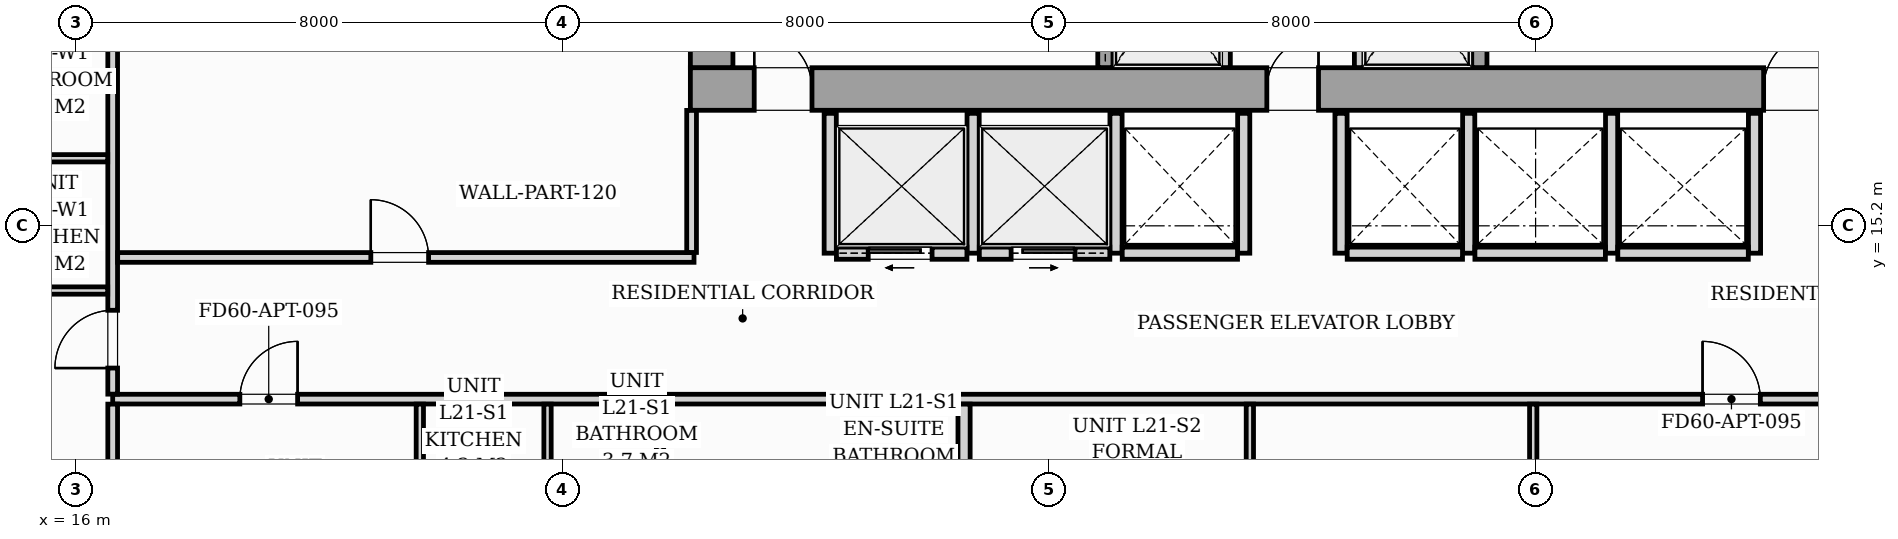
"""IFC4 building model, lengths in metres.
Left out: names, types, materials, properties, quantities, classifications, styles, units other than length and angle.
Written with IfcOpenShell. Run it as: python <this file> out.ifc"""

import sys

from ifc_helpers import new_model, si_unit, direction, frame, frame_2d, origin, origin_2d, place, context, subcontext, project, spatial, rectangle, i_section, extrude, source, transform, mapped, element, fill, save


model = new_model("IFC4")
c1 = context("Model", 3, precision=1e-05, world=origin(), true_north=direction((0.0, 1.0)))
c2 = subcontext(c1, "Body", "Model", "MODEL_VIEW")
j1 = project(units=[si_unit("LENGTHUNIT", "METRE"), si_unit("PLANEANGLEUNIT", "RADIAN")], contexts=[c1])
p1 = place(None, origin())
s1 = spatial("IfcSite", under=j1, at=p1, CompositionType="ELEMENT")
p2 = place(p1, origin())
s2 = spatial("IfcBuilding", under=s1, at=p2, CompositionType="ELEMENT")
p3 = place(p2, frame((0.0, 0.0, 77.8)))
s3 = spatial("IfcBuildingStorey", under=s2, at=p3, CompositionType="ELEMENT", Elevation=77.8)
m1 = source(origin(), c2, "Body", "SweptSolid", [
    extrude(i_section(OverallWidth=0.427, OverallDepth=0.483, WebThickness=0.051, FlangeThickness=0.082, FilletRadius=0.018, at=origin_2d()), origin(), (0.0, 0.0, 1.0), 3.196),
])
for number, where, z_axis, x_axis in (
    (1, (26.4, 17.4, 0.002), (0.0, 0.0, 1.0), (1.0, 0.0, 0.0)),
    (2, (33.12, 17.4, 0.002), (0.0, 0.0, 1.0), (1.0, 0.0, 0.0)),
    (3, (38.88, 17.4, 0.002), (0.0, 0.0, 1.0), (1.0, 0.0, 0.0)),
):
    element("IfcColumn", number, at=place(p3, frame(where, z_axis=z_axis, x_axis=x_axis)), inside=s3, PredefinedType="PILASTER", context=c2, shape_type="MappedRepresentation", body=[
        mapped(m1, transform((0.0, 0.0, 0.0), scale=1.0)),
    ])
p4 = place(p3, frame((26.1, 17.45, 0.0), z_axis=(0.0, 0.0, 1.0), x_axis=(1.0, 0.0, 0.0)))
e4 = element("IfcWall", 4, at=p4, inside=s3, PredefinedType="SHEAR", context=c2, shape_type="SweptSolid", body=[
    extrude(rectangle(XDim=19.8, YDim=0.7, at=frame_2d((9.9, 0.0))), origin(), (0.0, 0.0, 1.0), 3.2),
])
p5 = place(p4, frame((1.05, 0.0, 0.0)))
e5 = element("IfcOpeningElement", 5, at=p5, cuts=e4, PredefinedType="OPENING", context=c2, shape_type="SweptSolid", body=[
    extrude(rectangle(XDim=0.95, YDim=2.06, at=frame_2d((0.475, 1.03))), frame((0.0, 0.36, 0.0), z_axis=(0.0, -1.0, 0.0), x_axis=(1.0, 0.0, 0.0)), (0.0, 0.0, 1.0), 0.72),
])
p6 = place(p4, frame((9.48, 0.0, 0.0)))
e6 = element("IfcOpeningElement", 6, at=p6, cuts=e4, PredefinedType="OPENING", context=c2, shape_type="SweptSolid", body=[
    extrude(rectangle(XDim=0.85, YDim=2.0, at=frame_2d((0.425, 1.0))), frame((0.0, 0.36, 0.0), z_axis=(0.0, -1.0, 0.0), x_axis=(1.0, 0.0, 0.0)), (0.0, 0.0, 1.0), 0.72),
])
p7 = place(p4, frame((17.65, 0.0, 0.0)))
e7 = element("IfcOpeningElement", 7, at=p7, cuts=e4, PredefinedType="OPENING", context=c2, shape_type="SweptSolid", body=[
    extrude(rectangle(XDim=0.95, YDim=2.06, at=frame_2d((0.475, 1.03))), frame((0.0, 0.36, 0.0), z_axis=(0.0, -1.0, 0.0), x_axis=(1.0, 0.0, 0.0)), (0.0, 0.0, 1.0), 0.72),
])
p8 = place(p3, frame((26.45, 17.802, 0.0), z_axis=(0.0, 0.0, 1.0), x_axis=(0.0, 1.0, 0.0)))
e8 = element("IfcWall", 8, at=p8, inside=s3, PredefinedType="SHEAR", context=c2, shape_type="SweptSolid", body=[
    extrude(rectangle(XDim=5.796, YDim=0.7, at=frame_2d((2.898, 0.0))), origin(), (0.0, 0.0, 1.0), 3.2),
])
p9 = place(p3, frame((32.925, 17.802, 0.0), z_axis=(0.0, 0.0, 1.0), x_axis=(0.0, 1.0, 0.0)))
e9 = element("IfcWall", 9, at=p9, inside=s3, PredefinedType="SOLIDWALL", context=c2, shape_type="SweptSolid", body=[
    extrude(rectangle(XDim=2.646, YDim=0.25, at=frame_2d((1.323, 0.0))), origin(), (0.0, 0.0, 1.0), 3.2),
])
p10 = place(p9, frame((0.598, 0.0, 0.0)))
e10 = element("IfcOpeningElement", 10, at=p10, cuts=e9, PredefinedType="OPENING", context=c2, shape_type="SweptSolid", body=[
    extrude(rectangle(XDim=1.1, YDim=2.08, at=frame_2d((0.55, 1.04))), frame((0.0, 0.135, 0.0), z_axis=(0.0, -1.0, 0.0), x_axis=(1.0, 0.0, 0.0)), (0.0, 0.0, 1.0), 0.27),
])
for number, where, z_axis, x_axis in (
    (11, (34.9, 17.802, 0.0), (0.0, 0.0, 1.0), (0.0, 1.0, 0.0)),
    (12, (37.1, 17.802, 0.0), (0.0, 0.0, 1.0), (0.0, 1.0, 0.0)),
):
    element("IfcWall", number, at=place(p3, frame(where, z_axis=z_axis, x_axis=x_axis)), inside=s3, PredefinedType="PARTITIONING", context=c2, shape_type="SweptSolid", body=[
        extrude(rectangle(XDim=2.646, YDim=0.16, at=frame_2d((1.323, 0.0))), origin(), (0.0, 0.0, 1.0), 2.94),
    ])
p11 = place(p3, frame((39.075, 17.802, 0.0), z_axis=(0.0, 0.0, 1.0), x_axis=(0.0, 1.0, 0.0)))
e13 = element("IfcWall", 13, at=p11, inside=s3, PredefinedType="SOLIDWALL", context=c2, shape_type="SweptSolid", body=[
    extrude(rectangle(XDim=2.646, YDim=0.25, at=frame_2d((1.323, 0.0))), origin(), (0.0, 0.0, 1.0), 3.2),
])
p12 = place(p11, frame((0.598, 0.0, 0.0)))
e14 = element("IfcOpeningElement", 14, at=p12, cuts=e13, PredefinedType="OPENING", context=c2, shape_type="SweptSolid", body=[
    extrude(rectangle(XDim=1.1, YDim=2.08, at=frame_2d((0.55, 1.04))), frame((0.0, 0.135, 0.0), z_axis=(0.0, -1.0, 0.0), x_axis=(1.0, 0.0, 0.0)), (0.0, 0.0, 1.0), 0.27),
])
for number, where, z_axis, x_axis in (
    (15, (28.4, 14.75, 0.0), (0.0, 0.0, 1.0), (0.0, 1.0, 0.0)),
    (16, (30.75, 14.75, 0.0), (0.0, 0.0, 1.0), (0.0, 1.0, 0.0)),
    (17, (33.1, 14.75, 0.0), (0.0, 0.0, 1.0), (0.0, 1.0, 0.0)),
):
    element("IfcWall", number, at=place(p3, frame(where, z_axis=z_axis, x_axis=x_axis)), inside=s3, PredefinedType="PARTITIONING", context=c2, shape_type="SweptSolid", body=[
        extrude(rectangle(XDim=2.3, YDim=0.2, at=frame_2d((1.15, 0.0))), origin(), (0.0, 0.0, 1.0), 2.94),
    ])
p13 = place(p3, frame((28.502, 14.75, 0.0), z_axis=(0.0, 0.0, 1.0), x_axis=(1.0, 0.0, 0.0)))
e18 = element("IfcWall", 18, at=p13, inside=s3, PredefinedType="PARTITIONING", context=c2, shape_type="SweptSolid", body=[
    extrude(rectangle(XDim=2.146, YDim=0.2, at=frame_2d((1.073, 0.0))), origin(), (0.0, 0.0, 1.0), 2.94),
])
p14 = place(p13, frame((0.523, 0.0, 0.0)))
e19 = element("IfcOpeningElement", 19, at=p14, cuts=e18, PredefinedType="OPENING", context=c2, shape_type="SweptSolid", body=[
    extrude(rectangle(XDim=1.05, YDim=2.08, at=frame_2d((0.525, 1.04))), frame((0.0, 0.11, 0.0), z_axis=(0.0, -1.0, 0.0), x_axis=(1.0, 0.0, 0.0)), (0.0, 0.0, 1.0), 0.22),
])
p15 = place(p3, frame((30.852, 14.75, 0.0), z_axis=(0.0, 0.0, 1.0), x_axis=(1.0, 0.0, 0.0)))
e20 = element("IfcWall", 20, at=p15, inside=s3, PredefinedType="PARTITIONING", context=c2, shape_type="SweptSolid", body=[
    extrude(rectangle(XDim=2.146, YDim=0.2, at=frame_2d((1.073, 0.0))), origin(), (0.0, 0.0, 1.0), 2.94),
])
p16 = place(p15, frame((0.523, 0.0, 0.0)))
e21 = element("IfcOpeningElement", 21, at=p16, cuts=e20, PredefinedType="OPENING", context=c2, shape_type="SweptSolid", body=[
    extrude(rectangle(XDim=1.05, YDim=2.08, at=frame_2d((0.525, 1.04))), frame((0.0, 0.11, 0.0), z_axis=(0.0, -1.0, 0.0), x_axis=(1.0, 0.0, 0.0)), (0.0, 0.0, 1.0), 0.22),
])
p17 = place(p3, frame((35.2, 14.75, 0.0), z_axis=(0.0, 0.0, 1.0), x_axis=(0.0, 1.0, 0.0)))
e22 = element("IfcWall", 22, at=p17, inside=s3, PredefinedType="PARTITIONING", context=c2, shape_type="SweptSolid", body=[
    extrude(rectangle(XDim=2.3, YDim=0.2, at=frame_2d((1.15, 0.0))), origin(), (0.0, 0.0, 1.0), 2.94),
])
p18 = place(p3, frame((33.202, 14.75, 0.0), z_axis=(0.0, 0.0, 1.0), x_axis=(1.0, 0.0, 0.0)))
e23 = element("IfcWall", 23, at=p18, inside=s3, PredefinedType="PARTITIONING", context=c2, shape_type="SweptSolid", body=[
    extrude(rectangle(XDim=1.896, YDim=0.2, at=frame_2d((0.948, 0.0))), origin(), (0.0, 0.0, 1.0), 2.94),
])
for number, where, z_axis, x_axis in (
    (24, (36.8, 14.75, 0.0), (0.0, 0.0, 1.0), (0.0, 1.0, 0.0)),
    (25, (38.9, 14.75, 0.0), (0.0, 0.0, 1.0), (0.0, 1.0, 0.0)),
):
    element("IfcWall", number, at=place(p3, frame(where, z_axis=z_axis, x_axis=x_axis)), inside=s3, PredefinedType="PARTITIONING", context=c2, shape_type="SweptSolid", body=[
        extrude(rectangle(XDim=2.3, YDim=0.2, at=frame_2d((1.15, 0.0))), origin(), (0.0, 0.0, 1.0), 2.94),
    ])
p19 = place(p3, frame((36.902, 14.75, 0.0), z_axis=(0.0, 0.0, 1.0), x_axis=(1.0, 0.0, 0.0)))
e26 = element("IfcWall", 26, at=p19, inside=s3, PredefinedType="PARTITIONING", context=c2, shape_type="SweptSolid", body=[
    extrude(rectangle(XDim=1.896, YDim=0.2, at=frame_2d((0.948, 0.0))), origin(), (0.0, 0.0, 1.0), 2.94),
])
for number, where, z_axis, x_axis in (
    (27, (41.25, 14.75, 0.0), (0.0, 0.0, 1.0), (0.0, 1.0, 0.0)),
    (28, (43.6, 14.75, 0.0), (0.0, 0.0, 1.0), (0.0, 1.0, 0.0)),
):
    element("IfcWall", number, at=place(p3, frame(where, z_axis=z_axis, x_axis=x_axis)), inside=s3, PredefinedType="PARTITIONING", context=c2, shape_type="SweptSolid", body=[
        extrude(rectangle(XDim=2.3, YDim=0.2, at=frame_2d((1.15, 0.0))), origin(), (0.0, 0.0, 1.0), 2.94),
    ])
for number, where, z_axis, x_axis in (
    (29, (39.002, 14.75, 0.0), (0.0, 0.0, 1.0), (1.0, 0.0, 0.0)),
    (30, (41.352, 14.75, 0.0), (0.0, 0.0, 1.0), (1.0, 0.0, 0.0)),
):
    element("IfcWall", number, at=place(p3, frame(where, z_axis=z_axis, x_axis=x_axis)), inside=s3, PredefinedType="PARTITIONING", context=c2, shape_type="SweptSolid", body=[
        extrude(rectangle(XDim=2.146, YDim=0.2, at=frame_2d((1.073, 0.0))), origin(), (0.0, 0.0, 1.0), 2.94),
    ])
p20 = place(p3, frame((16.6, 12.35, 0.0), z_axis=(0.0, 0.0, 1.0), x_axis=(1.0, 0.0, 0.0)))
e31 = element("IfcWall", 31, at=p20, inside=s3, PredefinedType="PARTITIONING", context=c2, shape_type="SweptSolid", body=[
    extrude(rectangle(XDim=37.6, YDim=0.16, at=frame_2d((18.8, 0.0))), origin(), (0.0, 0.0, 1.0), 2.94),
])
p21 = place(p20, frame((2.091, 0.0, 0.0)))
e32 = element("IfcOpeningElement", 32, at=p21, cuts=e31, PredefinedType="OPENING", context=c2, shape_type="SweptSolid", body=[
    extrude(rectangle(XDim=0.95, YDim=2.06, at=frame_2d((0.475, 1.03))), frame((0.0, 0.09, 0.0), z_axis=(0.0, -1.0, 0.0), x_axis=(1.0, 0.0, 0.0)), (0.0, 0.0, 1.0), 0.18),
])
p22 = place(p20, frame((26.146, 0.0, 0.0)))
e33 = element("IfcOpeningElement", 33, at=p22, cuts=e31, PredefinedType="OPENING", context=c2, shape_type="SweptSolid", body=[
    extrude(rectangle(XDim=0.95, YDim=2.06, at=frame_2d((0.475, 1.03))), frame((0.0, 0.09, 0.0), z_axis=(0.0, -1.0, 0.0), x_axis=(1.0, 0.0, 0.0)), (0.0, 0.0, 1.0), 0.18),
])
p23 = place(p3, frame((16.6, 4.341, 0.0), z_axis=(0.0, 0.0, 1.0), x_axis=(0.0, 1.0, 0.0)))
e34 = element("IfcWall", 34, at=p23, inside=s3, PredefinedType="PARTITIONING", context=c2, shape_type="SweptSolid", body=[
    extrude(rectangle(XDim=7.927, YDim=0.16, at=frame_2d((3.964, 0.0))), origin(), (0.0, 0.0, 1.0), 2.94),
])
p24 = place(p3, frame((16.6, 12.432, 0.0), z_axis=(0.0, 0.0, 1.0), x_axis=(0.0, 1.0, 0.0)))
e35 = element("IfcWall", 35, at=p24, inside=s3, PredefinedType="PARTITIONING", context=c2, shape_type="SweptSolid", body=[
    extrude(rectangle(XDim=11.475, YDim=0.16, at=frame_2d((5.738, 0.0))), origin(), (0.0, 0.0, 1.0), 2.94),
])
p25 = place(p24, frame((0.429, 0.0, 0.0)))
e36 = element("IfcOpeningElement", 36, at=p25, cuts=e35, PredefinedType="OPENING", context=c2, shape_type="SweptSolid", body=[
    extrude(rectangle(XDim=0.95, YDim=2.06, at=frame_2d((0.475, 1.03))), frame((0.0, 0.09, 0.0), z_axis=(0.0, -1.0, 0.0), x_axis=(1.0, 0.0, 0.0)), (0.0, 0.0, 1.0), 0.18),
])
p26 = place(p3, frame((25.601, 5.208, 0.0), z_axis=(0.0, 0.0, 1.0), x_axis=(0.0, 1.0, 0.0)))
e37 = element("IfcWall", 37, at=p26, inside=s3, PredefinedType="PARTITIONING", context=c2, shape_type="SweptSolid", body=[
    extrude(rectangle(XDim=7.061, YDim=0.12, at=frame_2d((3.53, 0.0))), origin(), (0.0, 0.0, 1.0), 2.94),
])
p27 = place(p26, frame((3.792, 0.0, 0.0)))
e38 = element("IfcOpeningElement", 38, at=p27, cuts=e37, PredefinedType="OPENING", context=c2, shape_type="SweptSolid", body=[
    extrude(rectangle(XDim=0.9, YDim=2.05, at=frame_2d((0.45, 1.025))), frame((0.0, 0.07, 0.0), z_axis=(0.0, -1.0, 0.0), x_axis=(1.0, 0.0, 0.0)), (0.0, 0.0, 1.0), 0.14),
])
for number, where, z_axis, x_axis in (
    (39, (23.751, 10.162, 0.0), (0.0, 0.0, 1.0), (0.0, 1.0, 0.0)),
    (40, (21.651, 10.162, 0.0), (0.0, 0.0, 1.0), (0.0, 1.0, 0.0)),
):
    element("IfcWall", number, at=place(p3, frame(where, z_axis=z_axis, x_axis=x_axis)), inside=s3, PredefinedType="PARTITIONING", context=c2, shape_type="SweptSolid", body=[
        extrude(rectangle(XDim=2.106, YDim=0.12, at=frame_2d((1.053, 0.0))), origin(), (0.0, 0.0, 1.0), 2.94),
    ])
p28 = place(p3, frame((30.601, 10.112, 0.0), z_axis=(0.0, 0.0, 1.0), x_axis=(0.0, 1.0, 0.0)))
e41 = element("IfcWall", 41, at=p28, inside=s3, PredefinedType="PARTITIONING", context=c2, shape_type="SweptSolid", body=[
    extrude(rectangle(XDim=2.156, YDim=0.2, at=frame_2d((1.078, 0.0))), origin(), (0.0, 0.0, 1.0), 2.94),
])
p29 = place(p3, frame((35.301, 5.958, 0.0), z_axis=(0.0, 0.0, 1.0), x_axis=(0.0, 1.0, 0.0)))
e42 = element("IfcWall", 42, at=p29, inside=s3, PredefinedType="PARTITIONING", context=c2, shape_type="SweptSolid", body=[
    extrude(rectangle(XDim=6.31, YDim=0.12, at=frame_2d((3.155, 0.0))), origin(), (0.0, 0.0, 1.0), 2.94),
])
p30 = place(p29, frame((2.758, 0.0, 0.0)))
e43 = element("IfcOpeningElement", 43, at=p30, cuts=e42, PredefinedType="OPENING", context=c2, shape_type="SweptSolid", body=[
    extrude(rectangle(XDim=0.85, YDim=2.05, at=frame_2d((0.425, 1.025))), frame((0.0, 0.07, 0.0), z_axis=(0.0, -1.0, 0.0), x_axis=(1.0, 0.0, 0.0)), (0.0, 0.0, 1.0), 0.14),
])
p31 = place(p3, frame((39.961, 6.407, 0.0), z_axis=(0.0, 0.0, 1.0), x_axis=(0.0, 1.0, 0.0)))
e44 = element("IfcWall", 44, at=p31, inside=s3, PredefinedType="PARTITIONING", context=c2, shape_type="SweptSolid", body=[
    extrude(rectangle(XDim=5.861, YDim=0.12, at=frame_2d((2.93, 0.0))), origin(), (0.0, 0.0, 1.0), 2.94),
])
p32 = place(p31, frame((2.365, 0.0, 0.0)))
e45 = element("IfcOpeningElement", 45, at=p32, cuts=e44, PredefinedType="OPENING", context=c2, shape_type="SweptSolid", body=[
    extrude(rectangle(XDim=0.85, YDim=2.05, at=frame_2d((0.425, 1.025))), frame((0.0, 0.07, 0.0), z_axis=(0.0, -1.0, 0.0), x_axis=(1.0, 0.0, 0.0)), (0.0, 0.0, 1.0), 0.14),
])
for number, where, z_axis, x_axis in (
    (46, (14.262, 16.311, 0.0), (0.0, 0.0, 1.0), (1.0, 0.0, 0.0)),
    (47, (14.262, 14.136, 0.0), (0.0, 0.0, 1.0), (1.0, 0.0, 0.0)),
):
    element("IfcWall", number, at=place(p3, frame(where, z_axis=z_axis, x_axis=x_axis)), inside=s3, PredefinedType="PARTITIONING", context=c2, shape_type="SweptSolid", body=[
        extrude(rectangle(XDim=2.256, YDim=0.12, at=frame_2d((1.128, 0.0))), origin(), (0.0, 0.0, 1.0), 2.94),
    ])
p33 = place(p3, frame((16.682, 14.68, 0.0), z_axis=(0.0, 0.0, 1.0), x_axis=(1.0, 0.0, 0.0)))
e48 = element("IfcWall", 48, at=p33, inside=s3, PredefinedType="PARTITIONING", context=c2, shape_type="SweptSolid", body=[
    extrude(rectangle(XDim=9.478, YDim=0.16, at=frame_2d((4.739, 0.0))), origin(), (0.0, 0.0, 1.0), 2.94),
])
p34 = place(p33, frame((4.163, 0.0, 0.0)))
e49 = element("IfcOpeningElement", 49, at=p34, cuts=e48, PredefinedType="OPENING", context=c2, shape_type="SweptSolid", body=[
    extrude(rectangle(XDim=0.95, YDim=2.06, at=frame_2d((0.475, 1.03))), frame((0.0, 0.09, 0.0), z_axis=(0.0, -1.0, 0.0), x_axis=(1.0, 0.0, 0.0)), (0.0, 0.0, 1.0), 0.18),
])
p35 = place(p3, frame((26.12, 14.762, 0.0), z_axis=(0.0, 0.0, 1.0), x_axis=(0.0, 1.0, 0.0)))
e50 = element("IfcWall", 50, at=p35, inside=s3, PredefinedType="PARTITIONING", context=c2, shape_type="SweptSolid", body=[
    extrude(rectangle(XDim=2.336, YDim=0.16, at=frame_2d((1.168, 0.0))), origin(), (0.0, 0.0, 1.0), 2.94),
])
m2 = source(origin(), c2, "Body", "SweptSolid", [
    extrude(rectangle(XDim=0.95, YDim=2.06, at=frame_2d((0.475, 1.03))), frame((0.0, 0.025, 0.0), z_axis=(0.0, -1.0, 0.0), x_axis=(1.0, 0.0, 0.0)), (0.0, 0.0, 1.0), 0.05),
])
p36 = place(p5, origin())
e51 = element("IfcDoor", 51, at=p36, inside=s3, OperationType="SINGLE_SWING_LEFT", PredefinedType="DOOR", context=c2, shape_type="MappedRepresentation", body=[
    mapped(m2, transform((0.0, 0.0, 0.0), scale=1.0)),
])
fill(e5, e51)
m3 = source(origin(), c2, "Body", "SweptSolid", [
    extrude(rectangle(XDim=0.85, YDim=2.0, at=frame_2d((0.425, 1.0))), frame((0.0, 0.025, 0.0), z_axis=(0.0, -1.0, 0.0), x_axis=(1.0, 0.0, 0.0)), (0.0, 0.0, 1.0), 0.05),
])
p37 = place(p6, origin())
e52 = element("IfcDoor", 52, at=p37, inside=s3, OperationType="SINGLE_SWING_RIGHT", PredefinedType="DOOR", context=c2, shape_type="MappedRepresentation", body=[
    mapped(m3, transform((0.0, 0.0, 0.0), scale=1.0)),
])
fill(e6, e52)
p38 = place(p7, origin())
e53 = element("IfcDoor", 53, at=p38, inside=s3, OperationType="SINGLE_SWING_RIGHT", PredefinedType="DOOR", context=c2, shape_type="MappedRepresentation", body=[
    mapped(m2, transform((0.0, 0.0, 0.0), scale=1.0)),
])
fill(e7, e53)
m4 = source(origin(), c2, "Body", "SweptSolid", [
    extrude(rectangle(XDim=1.05, YDim=2.08, at=frame_2d((0.525, 1.04))), frame((0.0, 0.025, 0.0), z_axis=(0.0, -1.0, 0.0), x_axis=(1.0, 0.0, 0.0)), (0.0, 0.0, 1.0), 0.05),
])
p39 = place(p14, origin())
e54 = element("IfcDoor", 54, at=p39, inside=s3, OperationType="SLIDING_TO_LEFT", PredefinedType="DOOR", context=c2, shape_type="MappedRepresentation", body=[
    mapped(m4, transform((0.0, 0.0, 0.0), scale=1.0)),
])
fill(e19, e54)
p40 = place(p16, origin())
e55 = element("IfcDoor", 55, at=p40, inside=s3, OperationType="SLIDING_TO_RIGHT", PredefinedType="DOOR", context=c2, shape_type="MappedRepresentation", body=[
    mapped(m4, transform((0.0, 0.0, 0.0), scale=1.0)),
])
fill(e21, e55)
m5 = source(origin(), c2, "Body", "SweptSolid", [
    extrude(rectangle(XDim=0.95, YDim=2.06, at=frame_2d((0.475, 1.03))), frame((0.0, 0.025, 0.0), z_axis=(0.0, -1.0, 0.0), x_axis=(1.0, 0.0, 0.0)), (0.0, 0.0, 1.0), 0.05),
])
p41 = place(p21, origin())
e56 = element("IfcDoor", 56, at=p41, inside=s3, OperationType="SINGLE_SWING_RIGHT", PredefinedType="DOOR", context=c2, shape_type="MappedRepresentation", body=[
    mapped(m5, transform((0.0, 0.0, 0.0), scale=1.0)),
])
fill(e32, e56)
p42 = place(p22, origin())
e57 = element("IfcDoor", 57, at=p42, inside=s3, OperationType="SINGLE_SWING_LEFT", PredefinedType="DOOR", context=c2, shape_type="MappedRepresentation", body=[
    mapped(m5, transform((0.0, 0.0, 0.0), scale=1.0)),
])
fill(e33, e57)
p43 = place(p25, origin())
e58 = element("IfcDoor", 58, at=p43, inside=s3, OperationType="SINGLE_SWING_LEFT", PredefinedType="DOOR", context=c2, shape_type="MappedRepresentation", body=[
    mapped(m5, transform((0.0, 0.0, 0.0), scale=1.0)),
])
fill(e36, e58)
p44 = place(p34, origin())
e59 = element("IfcDoor", 59, at=p44, inside=s3, OperationType="SINGLE_SWING_LEFT", PredefinedType="DOOR", context=c2, shape_type="MappedRepresentation", body=[
    mapped(m5, transform((0.0, 0.0, 0.0), scale=1.0)),
])
fill(e49, e59)
save(model, sys.argv[1])
